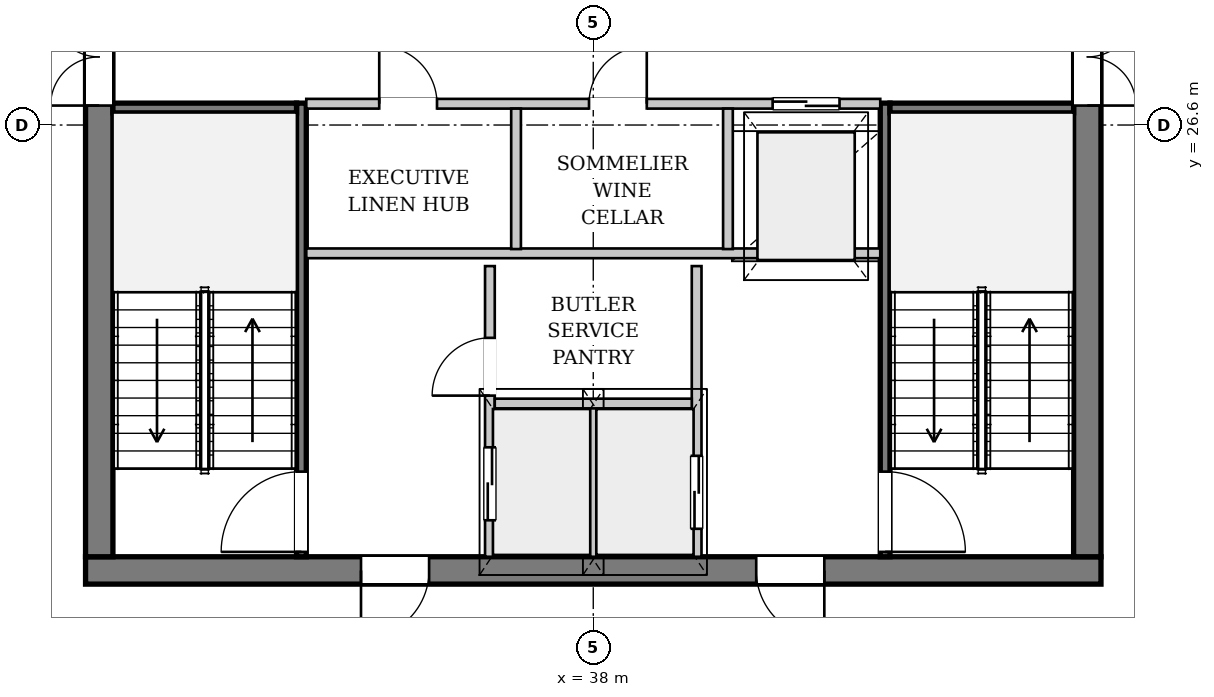
"""IFC4 building model, lengths in metres.
Left out: names, types, materials, properties, quantities, classifications, styles, units other than length and angle.
Written with IfcOpenShell. Run it as: python <this file> out.ifc"""

import sys

from ifc_helpers import new_model, si_unit, direction, frame, frame_2d, origin, place, context, subcontext, project, spatial, rectangle, extrude, source, transform, mapped, element, fill, save


model = new_model("IFC4")
c1 = context("Model", 3, precision=1e-05, world=origin(), true_north=direction((0.0, 1.0)))
c2 = subcontext(c1, "Body", "Model", "MODEL_VIEW")
j1 = project(units=[si_unit("LENGTHUNIT", "METRE"), si_unit("PLANEANGLEUNIT", "RADIAN")], contexts=[c1])
p1 = place(None, origin())
s1 = spatial("IfcSite", under=j1, at=p1, CompositionType="ELEMENT")
p2 = place(p1, origin())
s2 = spatial("IfcBuilding", under=s1, at=p2, CompositionType="ELEMENT")
p3 = place(p2, frame((0.0, 0.0, 220.25)))
s3 = spatial("IfcBuildingStorey", under=s2, at=p3, CompositionType="ELEMENT", Elevation=220.25)
p4 = place(p3, frame((52.95, 23.555, 0.0), z_axis=(0.0, 0.0, 1.0), x_axis=(-0.475160220621, -0.879899292385, 0.0)))
e1 = element("IfcWall", 1, at=p4, inside=s3, PredefinedType="SOLIDWALL", context=c2, shape_type="SweptSolid", body=[
    extrude(rectangle(XDim=23.072, YDim=0.32, at=frame_2d((11.536, 0.0))), origin(), (0.0, 0.0, 1.0), 2.822),
])
p5 = place(p4, frame((6.633, 0.0, 0.0)))
e2 = element("IfcOpeningElement", 2, at=p5, cuts=e1, PredefinedType="OPENING", context=c2, shape_type="SweptSolid", body=[
    extrude(rectangle(XDim=1.5, YDim=2.3, at=frame_2d((0.75, 1.15))), frame((0.0, 0.17, 0.0), z_axis=(0.0, -1.0, 0.0), x_axis=(1.0, 0.0, 0.0)), (0.0, 0.0, 1.0), 0.34),
])
p6 = place(p4, frame((15.773, 0.0, 0.352)))
e3 = element("IfcOpeningElement", 3, at=p6, cuts=e1, PredefinedType="OPENING", context=c2, shape_type="SweptSolid", body=[
    extrude(rectangle(XDim=2.6, YDim=2.35, at=frame_2d((1.3, 1.175))), frame((0.0, 0.17, 0.0), z_axis=(0.0, -1.0, 0.0), x_axis=(1.0, 0.0, 0.0)), (0.0, 0.0, 1.0), 0.34),
])
p7 = place(p3, frame((43.193, 3.495, 0.0), z_axis=(0.0, 0.0, 1.0), x_axis=(0.4699616568, 0.882686830726, 0.0)))
e4 = element("IfcWall", 4, at=p7, inside=s3, PredefinedType="PARAPET", context=c2, shape_type="SweptSolid", body=[
    extrude(rectangle(XDim=20.551, YDim=0.22, at=frame_2d((10.275, 0.0))), origin(), (0.0, 0.0, 1.0), 0.3),
])
p8 = place(p3, frame((46.35, 19.275, 0.0), z_axis=(0.0, 0.0, 1.0), x_axis=(-1.0, 0.0, 0.0)))
e5 = element("IfcWall", 5, at=p8, inside=s3, PredefinedType="SHEAR", context=c2, shape_type="SweptSolid", body=[
    extrude(rectangle(XDim=16.7, YDim=0.45, at=frame_2d((8.35, 0.0))), origin(), (0.0, 0.0, 1.0), 3.33),
])
p9 = place(p8, frame((4.55, 0.0, 0.0)))
e6 = element("IfcOpeningElement", 6, at=p9, cuts=e5, PredefinedType="OPENING", context=c2, shape_type="SweptSolid", body=[
    extrude(rectangle(XDim=1.12, YDim=2.25, at=frame_2d((0.56, 1.125))), frame((0.0, 0.235, 0.0), z_axis=(0.0, -1.0, 0.0), x_axis=(1.0, 0.0, 0.0)), (0.0, 0.0, 1.0), 0.47),
])
p10 = place(p8, frame((11.05, 0.0, 0.0)))
e7 = element("IfcOpeningElement", 7, at=p10, cuts=e5, PredefinedType="OPENING", context=c2, shape_type="SweptSolid", body=[
    extrude(rectangle(XDim=1.12, YDim=2.25, at=frame_2d((0.56, 1.125))), frame((0.0, 0.235, 0.0), z_axis=(0.0, -1.0, 0.0), x_axis=(1.0, 0.0, 0.0)), (0.0, 0.0, 1.0), 0.47),
])
p11 = place(p3, frame((29.875, 19.5, 0.0), z_axis=(0.0, 0.0, 1.0), x_axis=(0.0, 1.0, 0.0)))
e8 = element("IfcWall", 8, at=p11, inside=s3, PredefinedType="SHEAR", context=c2, shape_type="SweptSolid", body=[
    extrude(rectangle(XDim=14.2, YDim=0.45, at=frame_2d((7.1, 0.0))), origin(), (0.0, 0.0, 1.0), 3.33),
])
p12 = place(p11, frame((7.42, 0.0, 0.0)))
e9 = element("IfcOpeningElement", 9, at=p12, cuts=e8, PredefinedType="OPENING", context=c2, shape_type="SweptSolid", body=[
    extrude(rectangle(XDim=1.6, YDim=2.2, at=frame_2d((0.8, 1.1))), frame((0.0, 0.235, 0.0), z_axis=(0.0, -1.0, 0.0), x_axis=(1.0, 0.0, 0.0)), (0.0, 0.0, 1.0), 0.47),
])
p13 = place(p3, frame((46.125, 33.7, 0.0), z_axis=(0.0, 0.0, 1.0), x_axis=(0.0, -1.0, 0.0)))
e10 = element("IfcWall", 10, at=p13, inside=s3, PredefinedType="SHEAR", context=c2, shape_type="SweptSolid", body=[
    extrude(rectangle(XDim=14.2, YDim=0.45, at=frame_2d((7.1, 0.0))), origin(), (0.0, 0.0, 1.0), 3.33),
])
p14 = place(p13, frame((5.18, 0.0, 0.0)))
e11 = element("IfcOpeningElement", 11, at=p14, cuts=e10, PredefinedType="OPENING", context=c2, shape_type="SweptSolid", body=[
    extrude(rectangle(XDim=1.6, YDim=2.2, at=frame_2d((0.8, 1.1))), frame((0.0, 0.235, 0.0), z_axis=(0.0, -1.0, 0.0), x_axis=(1.0, 0.0, 0.0)), (0.0, 0.0, 1.0), 0.47),
])
p15 = place(p13, frame((2.05, 0.0, 0.0)))
e12 = element("IfcOpeningElement", 12, at=p15, cuts=e10, PredefinedType="OPENING", context=c2, shape_type="SweptSolid", body=[
    extrude(rectangle(XDim=0.95, YDim=2.1, at=frame_2d((0.475, 1.05))), frame((0.0, 0.235, 0.0), z_axis=(0.0, -1.0, 0.0), x_axis=(1.0, 0.0, 0.0)), (0.0, 0.0, 1.0), 0.47),
])
p16 = place(p3, frame((33.2, 19.5, 0.0), z_axis=(0.0, 0.0, 1.0), x_axis=(0.0, 1.0, 0.0)))
e13 = element("IfcWall", 13, at=p16, inside=s3, PredefinedType="PARTITIONING", context=c2, shape_type="SweptSolid", body=[
    extrude(rectangle(XDim=7.46, YDim=0.16, at=frame_2d((3.73, 0.0))), origin(), (0.0, 0.0, 1.0), 3.33),
])
p17 = place(p16, frame((0.08, 0.0, 0.0)))
e14 = element("IfcOpeningElement", 14, at=p17, cuts=e13, PredefinedType="OPENING", context=c2, shape_type="SweptSolid", body=[
    extrude(rectangle(XDim=1.32, YDim=2.2, at=frame_2d((0.66, 1.1))), frame((0.0, 0.09, 0.0), z_axis=(0.0, -1.0, 0.0), x_axis=(1.0, 0.0, 0.0)), (0.0, 0.0, 1.0), 0.18),
])
p18 = place(p3, frame((30.1, 26.88, 0.0), z_axis=(0.0, 0.0, 1.0), x_axis=(1.0, 0.0, 0.0)))
e15 = element("IfcWall", 15, at=p18, inside=s3, PredefinedType="PARTITIONING", context=c2, shape_type="SweptSolid", body=[
    extrude(rectangle(XDim=3.02, YDim=0.16, at=frame_2d((1.51, 0.0))), origin(), (0.0, 0.0, 1.0), 3.33),
])
p19 = place(p3, frame((42.8, 26.96, 0.0), z_axis=(0.0, 0.0, 1.0), x_axis=(0.0, -1.0, 0.0)))
e16 = element("IfcWall", 16, at=p19, inside=s3, PredefinedType="PARTITIONING", context=c2, shape_type="SweptSolid", body=[
    extrude(rectangle(XDim=7.46, YDim=0.16, at=frame_2d((3.73, 0.0))), origin(), (0.0, 0.0, 1.0), 3.33),
])
p20 = place(p19, frame((6.06, 0.0, 0.0)))
e17 = element("IfcOpeningElement", 17, at=p20, cuts=e16, PredefinedType="OPENING", context=c2, shape_type="SweptSolid", body=[
    extrude(rectangle(XDim=1.32, YDim=2.2, at=frame_2d((0.66, 1.1))), frame((0.0, 0.09, 0.0), z_axis=(0.0, -1.0, 0.0), x_axis=(1.0, 0.0, 0.0)), (0.0, 0.0, 1.0), 0.18),
])
p21 = place(p3, frame((42.88, 26.88, 0.0), z_axis=(0.0, 0.0, 1.0), x_axis=(1.0, 0.0, 0.0)))
e18 = element("IfcWall", 18, at=p21, inside=s3, PredefinedType="PARTITIONING", context=c2, shape_type="SweptSolid", body=[
    extrude(rectangle(XDim=3.02, YDim=0.16, at=frame_2d((1.51, 0.0))), origin(), (0.0, 0.0, 1.0), 3.33),
])
p22 = place(p3, frame((36.3, 19.5, 0.0), z_axis=(0.0, 0.0, 1.0), x_axis=(0.0, 1.0, 0.0)))
e19 = element("IfcWall", 19, at=p22, inside=s3, PredefinedType="PARTITIONING", context=c2, shape_type="SweptSolid", body=[
    extrude(rectangle(XDim=4.78, YDim=0.16, at=frame_2d((2.39, 0.0))), origin(), (0.0, 0.0, 1.0), 3.33),
])
p23 = place(p22, frame((0.6, 0.0, 0.0)))
e20 = element("IfcOpeningElement", 20, at=p23, cuts=e19, PredefinedType="OPENING", context=c2, shape_type="SweptSolid", body=[
    extrude(rectangle(XDim=1.2, YDim=2.2, at=frame_2d((0.6, 1.1))), frame((0.0, 0.09, 0.0), z_axis=(0.0, -1.0, 0.0), x_axis=(1.0, 0.0, 0.0)), (0.0, 0.0, 1.0), 0.18),
])
p24 = place(p22, frame((2.65, 0.0, 0.0)))
e21 = element("IfcOpeningElement", 21, at=p24, cuts=e19, PredefinedType="OPENING", context=c2, shape_type="SweptSolid", body=[
    extrude(rectangle(XDim=0.95, YDim=2.1, at=frame_2d((0.475, 1.05))), frame((0.0, 0.09, 0.0), z_axis=(0.0, -1.0, 0.0), x_axis=(1.0, 0.0, 0.0)), (0.0, 0.0, 1.0), 0.18),
])
p25 = place(p3, frame((39.7, 24.28, 0.0), z_axis=(0.0, 0.0, 1.0), x_axis=(0.0, -1.0, 0.0)))
e22 = element("IfcWall", 22, at=p25, inside=s3, PredefinedType="PARTITIONING", context=c2, shape_type="SweptSolid", body=[
    extrude(rectangle(XDim=4.78, YDim=0.16, at=frame_2d((2.39, 0.0))), origin(), (0.0, 0.0, 1.0), 3.33),
])
p26 = place(p25, frame((3.12, 0.0, 0.0)))
e23 = element("IfcOpeningElement", 23, at=p26, cuts=e22, PredefinedType="OPENING", context=c2, shape_type="SweptSolid", body=[
    extrude(rectangle(XDim=1.2, YDim=2.2, at=frame_2d((0.6, 1.1))), frame((0.0, 0.09, 0.0), z_axis=(0.0, -1.0, 0.0), x_axis=(1.0, 0.0, 0.0)), (0.0, 0.0, 1.0), 0.18),
])
p27 = place(p3, frame((38.0, 19.5, 0.0), z_axis=(0.0, 0.0, 1.0), x_axis=(0.0, 1.0, 0.0)))
e24 = element("IfcWall", 24, at=p27, inside=s3, PredefinedType="PARTITIONING", context=c2, shape_type="SweptSolid", body=[
    extrude(rectangle(XDim=2.46, YDim=0.125, at=frame_2d((1.23, 0.0))), origin(), (0.0, 0.0, 1.0), 3.33),
])
p28 = place(p3, frame((36.38, 22.02, 0.0), z_axis=(0.0, 0.0, 1.0), x_axis=(1.0, 0.0, 0.0)))
e25 = element("IfcWall", 25, at=p28, inside=s3, PredefinedType="PARTITIONING", context=c2, shape_type="SweptSolid", body=[
    extrude(rectangle(XDim=3.24, YDim=0.16, at=frame_2d((1.62, 0.0))), origin(), (0.0, 0.0, 1.0), 3.33),
])
p29 = place(p3, frame((33.28, 24.49, 0.0), z_axis=(0.0, 0.0, 1.0), x_axis=(1.0, 0.0, 0.0)))
e26 = element("IfcWall", 26, at=p29, inside=s3, PredefinedType="PARTITIONING", context=c2, shape_type="SweptSolid", body=[
    extrude(rectangle(XDim=9.44, YDim=0.16, at=frame_2d((4.72, 0.0))), origin(), (0.0, 0.0, 1.0), 3.33),
])
p30 = place(p3, frame((33.28, 26.95, 0.0), z_axis=(0.0, 0.0, 1.0), x_axis=(1.0, 0.0, 0.0)))
e27 = element("IfcWall", 27, at=p30, inside=s3, PredefinedType="PARTITIONING", context=c2, shape_type="SweptSolid", body=[
    extrude(rectangle(XDim=9.44, YDim=0.16, at=frame_2d((4.72, 0.0))), origin(), (0.0, 0.0, 1.0), 3.33),
])
p31 = place(p30, frame((1.2, 0.0, 0.0)))
e28 = element("IfcOpeningElement", 28, at=p31, cuts=e27, PredefinedType="OPENING", context=c2, shape_type="SweptSolid", body=[
    extrude(rectangle(XDim=0.95, YDim=2.1, at=frame_2d((0.475, 1.05))), frame((0.0, 0.09, 0.0), z_axis=(0.0, -1.0, 0.0), x_axis=(1.0, 0.0, 0.0)), (0.0, 0.0, 1.0), 0.18),
])
p32 = place(p30, frame((4.65, 0.0, 0.0)))
e29 = element("IfcOpeningElement", 29, at=p32, cuts=e27, PredefinedType="OPENING", context=c2, shape_type="SweptSolid", body=[
    extrude(rectangle(XDim=0.95, YDim=2.1, at=frame_2d((0.475, 1.05))), frame((0.0, 0.09, 0.0), z_axis=(0.0, -1.0, 0.0), x_axis=(1.0, 0.0, 0.0)), (0.0, 0.0, 1.0), 0.18),
])
p33 = place(p30, frame((7.67, 0.0, 0.0)))
e30 = element("IfcOpeningElement", 30, at=p33, cuts=e27, PredefinedType="OPENING", context=c2, shape_type="SweptSolid", body=[
    extrude(rectangle(XDim=1.1, YDim=2.2, at=frame_2d((0.55, 1.1))), frame((0.0, 0.09, 0.0), z_axis=(0.0, -1.0, 0.0), x_axis=(1.0, 0.0, 0.0)), (0.0, 0.0, 1.0), 0.18),
])
for number, where, z_axis, x_axis in (
    (31, (36.73, 24.56, 0.0), (0.0, 0.0, 1.0), (0.0, 1.0, 0.0)),
    (32, (40.215, 24.56, 0.0), (0.0, 0.0, 1.0), (0.0, 1.0, 0.0)),
):
    element("IfcWall", number, at=place(p3, frame(where, z_axis=z_axis, x_axis=x_axis)), inside=s3, PredefinedType="PARTITIONING", context=c2, shape_type="SweptSolid", body=[
        extrude(rectangle(XDim=2.31, YDim=0.16, at=frame_2d((1.155, 0.0))), origin(), (0.0, 0.0, 1.0), 3.33),
    ])
m1 = source(origin(), c2, "Body", "SweptSolid", [
    extrude(rectangle(XDim=1.12, YDim=2.25, at=frame_2d((0.56, 1.125))), frame((0.0, 0.025, 0.0), z_axis=(0.0, -1.0, 0.0), x_axis=(1.0, 0.0, 0.0)), (0.0, 0.0, 1.0), 0.05),
])
p34 = place(p9, origin())
e33 = element("IfcDoor", 33, at=p34, inside=s3, OperationType="SINGLE_SWING_LEFT", PredefinedType="DOOR", context=c2, shape_type="MappedRepresentation", body=[
    mapped(m1, transform((0.0, 0.0, 0.0), x_axis=(1.0, 0.0, 0.0), y_axis=(0.0, 1.0, 0.0), z_axis=(0.0, 0.0, 1.0), scale=1.0)),
])
fill(e6, e33)
p35 = place(p10, origin())
e34 = element("IfcDoor", 34, at=p35, inside=s3, OperationType="SINGLE_SWING_RIGHT", PredefinedType="DOOR", context=c2, shape_type="MappedRepresentation", body=[
    mapped(m1, transform((0.0, 0.0, 0.0), x_axis=(1.0, 0.0, 0.0), y_axis=(0.0, 1.0, 0.0), z_axis=(0.0, 0.0, 1.0), scale=1.0)),
])
fill(e7, e34)
m2 = source(origin(), c2, "Body", "SweptSolid", [
    extrude(rectangle(XDim=1.6, YDim=2.2, at=frame_2d((0.8, 1.1))), frame((0.0, 0.025, 0.0), z_axis=(0.0, -1.0, 0.0), x_axis=(1.0, 0.0, 0.0)), (0.0, 0.0, 1.0), 0.05),
])
p36 = place(p12, origin())
e35 = element("IfcDoor", 35, at=p36, inside=s3, OperationType="DOUBLE_DOOR_SINGLE_SWING", PredefinedType="DOOR", context=c2, shape_type="MappedRepresentation", body=[
    mapped(m2, transform((0.0, 0.0, 0.0), x_axis=(1.0, 0.0, 0.0), y_axis=(0.0, 1.0, 0.0), z_axis=(0.0, 0.0, 1.0), scale=1.0)),
])
fill(e9, e35)
p37 = place(p14, origin())
e36 = element("IfcDoor", 36, at=p37, inside=s3, OperationType="DOUBLE_DOOR_SINGLE_SWING", PredefinedType="DOOR", context=c2, shape_type="MappedRepresentation", body=[
    mapped(m2, transform((0.0, 0.0, 0.0), x_axis=(1.0, 0.0, 0.0), y_axis=(0.0, 1.0, 0.0), z_axis=(0.0, 0.0, 1.0), scale=1.0)),
])
fill(e11, e36)
m3 = source(origin(), c2, "Body", "SweptSolid", [
    extrude(rectangle(XDim=1.32, YDim=2.2, at=frame_2d((0.66, 1.1))), frame((0.0, 0.025, 0.0), z_axis=(0.0, -1.0, 0.0), x_axis=(1.0, 0.0, 0.0)), (0.0, 0.0, 1.0), 0.05),
])
p38 = place(p17, origin())
e37 = element("IfcDoor", 37, at=p38, inside=s3, OperationType="SINGLE_SWING_LEFT", PredefinedType="DOOR", context=c2, shape_type="MappedRepresentation", body=[
    mapped(m3, transform((0.0, 0.0, 0.0), x_axis=(1.0, 0.0, 0.0), y_axis=(0.0, 1.0, 0.0), z_axis=(0.0, 0.0, 1.0), scale=1.0)),
])
fill(e14, e37)
p39 = place(p20, origin())
e38 = element("IfcDoor", 38, at=p39, inside=s3, OperationType="SINGLE_SWING_RIGHT", PredefinedType="DOOR", context=c2, shape_type="MappedRepresentation", body=[
    mapped(m3, transform((0.0, 0.0, 0.0), x_axis=(1.0, 0.0, 0.0), y_axis=(0.0, 1.0, 0.0), z_axis=(0.0, 0.0, 1.0), scale=1.0)),
])
fill(e17, e38)
m4 = source(origin(), c2, "Body", "SweptSolid", [
    extrude(rectangle(XDim=1.2, YDim=2.2, at=frame_2d((0.6, 1.1))), frame((0.0, 0.025, 0.0), z_axis=(0.0, -1.0, 0.0), x_axis=(1.0, 0.0, 0.0)), (0.0, 0.0, 1.0), 0.05),
])
p40 = place(p23, origin())
e39 = element("IfcDoor", 39, at=p40, inside=s3, OperationType="DOUBLE_DOOR_SLIDING", PredefinedType="DOOR", context=c2, shape_type="MappedRepresentation", body=[
    mapped(m4, transform((0.0, 0.0, 0.0), x_axis=(1.0, 0.0, 0.0), y_axis=(0.0, 1.0, 0.0), z_axis=(0.0, 0.0, 1.0), scale=1.0)),
])
fill(e20, e39)
m5 = source(origin(), c2, "Body", "SweptSolid", [
    extrude(rectangle(XDim=0.95, YDim=2.1, at=frame_2d((0.475, 1.05))), frame((0.0, 0.025, 0.0), z_axis=(0.0, -1.0, 0.0), x_axis=(1.0, 0.0, 0.0)), (0.0, 0.0, 1.0), 0.05),
])
p41 = place(p24, origin())
e40 = element("IfcDoor", 40, at=p41, inside=s3, OperationType="SINGLE_SWING_LEFT", PredefinedType="DOOR", context=c2, shape_type="MappedRepresentation", body=[
    mapped(m5, transform((0.0, 0.0, 0.0), x_axis=(1.0, 0.0, 0.0), y_axis=(0.0, 1.0, 0.0), z_axis=(0.0, 0.0, 1.0), scale=1.0)),
])
fill(e21, e40)
p42 = place(p26, origin())
e41 = element("IfcDoor", 41, at=p42, inside=s3, OperationType="DOUBLE_DOOR_SLIDING", PredefinedType="DOOR", context=c2, shape_type="MappedRepresentation", body=[
    mapped(m4, transform((0.0, 0.0, 0.0), x_axis=(1.0, 0.0, 0.0), y_axis=(0.0, 1.0, 0.0), z_axis=(0.0, 0.0, 1.0), scale=1.0)),
])
fill(e23, e41)
p43 = place(p31, origin())
e42 = element("IfcDoor", 42, at=p43, inside=s3, OperationType="SINGLE_SWING_LEFT", PredefinedType="DOOR", context=c2, shape_type="MappedRepresentation", body=[
    mapped(m5, transform((0.0, 0.0, 0.0), x_axis=(1.0, 0.0, 0.0), y_axis=(0.0, 1.0, 0.0), z_axis=(0.0, 0.0, 1.0), scale=1.0)),
])
fill(e28, e42)
p44 = place(p32, origin())
e43 = element("IfcDoor", 43, at=p44, inside=s3, OperationType="SINGLE_SWING_RIGHT", PredefinedType="DOOR", context=c2, shape_type="MappedRepresentation", body=[
    mapped(m5, transform((0.0, 0.0, 0.0), x_axis=(1.0, 0.0, 0.0), y_axis=(0.0, 1.0, 0.0), z_axis=(0.0, 0.0, 1.0), scale=1.0)),
])
fill(e29, e43)
m6 = source(origin(), c2, "Body", "SweptSolid", [
    extrude(rectangle(XDim=1.1, YDim=2.2, at=frame_2d((0.55, 1.1))), frame((0.0, 0.025, 0.0), z_axis=(0.0, -1.0, 0.0), x_axis=(1.0, 0.0, 0.0)), (0.0, 0.0, 1.0), 0.05),
])
p45 = place(p33, origin())
e44 = element("IfcDoor", 44, at=p45, inside=s3, OperationType="DOUBLE_DOOR_SLIDING", PredefinedType="DOOR", context=c2, shape_type="MappedRepresentation", body=[
    mapped(m6, transform((0.0, 0.0, 0.0), x_axis=(1.0, 0.0, 0.0), y_axis=(0.0, 1.0, 0.0), z_axis=(0.0, 0.0, 1.0), scale=1.0)),
])
fill(e30, e44)
save(model, sys.argv[1])
